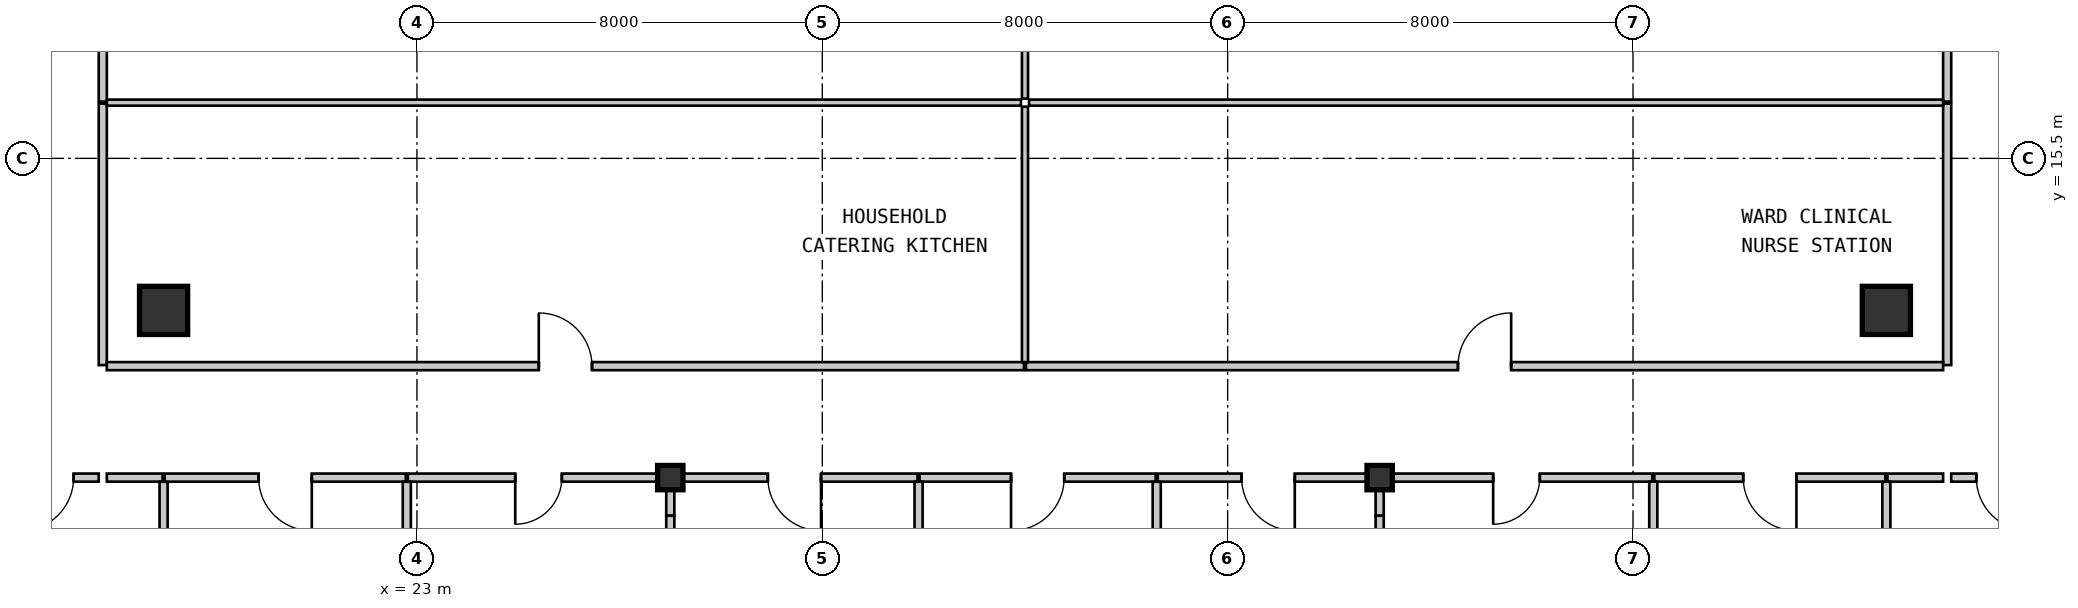
"""IFC4 building model, lengths in metres.
Left out: names, types, materials, properties, quantities, classifications, styles, units other than length and angle.
Written with IfcOpenShell. Run it as: python <this file> out.ifc"""

import sys

from ifc_helpers import new_model, si_unit, direction, frame, frame_2d, origin, origin_2d, place, context, subcontext, project, spatial, rectangle, i_section, extrude, source, transform, mapped, element, fill, save


model = new_model("IFC4")
c1 = context("Model", 3, precision=1e-05, world=origin(), true_north=direction((0.0, 1.0)))
c2 = subcontext(c1, "Body", "Model", "MODEL_VIEW")
j1 = project(units=[si_unit("LENGTHUNIT", "METRE"), si_unit("PLANEANGLEUNIT", "RADIAN")], contexts=[c1])
p1 = place(None, origin())
s1 = spatial("IfcSite", under=j1, at=p1, CompositionType="ELEMENT")
p2 = place(p1, origin())
s2 = spatial("IfcBuilding", under=s1, at=p2, CompositionType="ELEMENT")
p3 = place(p2, frame((0.0, 0.0, 19.95)))
s3 = spatial("IfcBuildingStorey", under=s2, at=p3, CompositionType="ELEMENT", Elevation=19.95)
m1 = source(origin(), c2, "Body", "SweptSolid", [
    extrude(i_section(OverallWidth=0.5, OverallDepth=0.48, WebThickness=0.028, FlangeThickness=0.044, at=origin_2d()), origin(), (0.0, 0.0, 1.0), 3.15),
])
for number, where, z_axis, x_axis in (
    (1, (28.0, 9.2, 0.0), (0.0, 0.0, 1.0), (1.0, 0.0, 0.0)),
    (2, (42.0, 9.2, 0.0), (0.0, 0.0, 1.0), (1.0, 0.0, 0.0)),
):
    element("IfcColumn", number, at=place(p3, frame(where, z_axis=z_axis, x_axis=x_axis)), inside=s3, PredefinedType="COLUMN", context=c2, shape_type="MappedRepresentation", body=[
        mapped(m1, transform((0.0, 0.0, 0.0), scale=1.0)),
    ])
m2 = source(origin(), c2, "Body", "SweptSolid", [
    extrude(rectangle(XDim=0.95, YDim=0.95, at=origin_2d()), origin(), (0.0, 0.0, 1.0), 3.15),
])
for number, where, z_axis, x_axis in (
    (3, (18.0, 12.5, 0.0), (0.0, 0.0, 1.0), (1.0, 0.0, 0.0)),
    (4, (52.0, 12.5, 0.0), (0.0, 0.0, 1.0), (1.0, 0.0, 0.0)),
):
    element("IfcColumn", number, at=place(p3, frame(where, z_axis=z_axis, x_axis=x_axis)), inside=s3, PredefinedType="COLUMN", context=c2, shape_type="MappedRepresentation", body=[
        mapped(m2, transform((0.0, 0.0, 0.0), scale=1.0)),
    ])
m3 = source(origin(), c2, "Body", "SweptSolid", [
    extrude(rectangle(XDim=5.16, YDim=0.16, at=frame_2d((2.58, 0.0))), origin(), (0.0, 0.0, 1.0), 2.93),
])
p4 = place(p3, frame((16.8, 16.58, 0.0), z_axis=(0.0, 0.0, 1.0), x_axis=(0.0, -1.0, 0.0)))
e5 = element("IfcWall", 5, at=p4, inside=s3, PredefinedType="PARTITIONING", context=c2, shape_type="MappedRepresentation", body=[
    mapped(m3, transform((0.0, 0.0, 0.0), scale=1.0)),
])
m4 = source(origin(), c2, "Body", "SweptSolid", [
    extrude(rectangle(XDim=5.1, YDim=0.16, at=frame_2d((2.55, 0.0))), origin(), (0.0, 0.0, 1.0), 2.93),
])
p5 = place(p3, frame((16.8, 21.72, 0.0), z_axis=(0.0, 0.0, 1.0), x_axis=(0.0, -1.0, 0.0)))
e6 = element("IfcWall", 6, at=p5, inside=s3, PredefinedType="PARTITIONING", context=c2, shape_type="MappedRepresentation", body=[
    mapped(m4, transform((0.0, 0.0, 0.0), scale=1.0)),
])
p6 = place(p3, frame((53.2, 11.42, 0.0), z_axis=(0.0, 0.0, 1.0), x_axis=(0.0, 1.0, 0.0)))
e7 = element("IfcWall", 7, at=p6, inside=s3, PredefinedType="PARTITIONING", context=c2, shape_type="MappedRepresentation", body=[
    mapped(m3, transform((0.0, 0.0, 0.0), scale=1.0)),
])
p7 = place(p3, frame((53.2, 16.62, 0.0), z_axis=(0.0, 0.0, 1.0), x_axis=(0.0, 1.0, 0.0)))
e8 = element("IfcWall", 8, at=p7, inside=s3, PredefinedType="PARTITIONING", context=c2, shape_type="MappedRepresentation", body=[
    mapped(m4, transform((0.0, 0.0, 0.0), scale=1.0)),
])
m5 = source(origin(), c2, "Body", "SweptSolid", [
    extrude(rectangle(XDim=2.04, YDim=0.16, at=frame_2d((1.02, 0.0))), origin(), (0.0, 0.0, 1.0), 2.93),
])
p8 = place(p3, frame((16.72, 9.2, 0.0), z_axis=(0.0, 0.0, 1.0), x_axis=(-1.0, 0.0, 0.0)))
e9 = element("IfcWall", 9, at=p8, inside=s3, PredefinedType="PARTITIONING", context=c2, shape_type="MappedRepresentation", body=[
    mapped(m5, transform((0.0, 0.0, 0.0), scale=1.0)),
])
m6 = source(origin(), c2, "Body", "SweptSolid", [
    extrude(rectangle(XDim=1.05, YDim=2.1, at=frame_2d((0.525, 1.05))), frame((0.0, 0.09, 0.0), z_axis=(0.0, -1.0, 0.0), x_axis=(1.0, 0.0, 0.0)), (0.0, 0.0, 1.0), 0.18),
])
p9 = place(p8, frame((0.495, 0.0, 0.0)))
e10 = element("IfcOpeningElement", 10, at=p9, cuts=e9, PredefinedType="OPENING", context=c2, shape_type="MappedRepresentation", body=[
    mapped(m6, transform((0.0, 0.0, 0.0), scale=1.0)),
])
p10 = place(p3, frame((55.32, 9.2, 0.0), z_axis=(0.0, 0.0, 1.0), x_axis=(-1.0, 0.0, 0.0)))
e11 = element("IfcWall", 11, at=p10, inside=s3, PredefinedType="PARTITIONING", context=c2, shape_type="MappedRepresentation", body=[
    mapped(m5, transform((0.0, 0.0, 0.0), scale=1.0)),
])
p11 = place(p10, frame((0.495, 0.0, 0.0)))
e12 = element("IfcOpeningElement", 12, at=p11, cuts=e11, PredefinedType="OPENING", context=c2, shape_type="MappedRepresentation", body=[
    mapped(m6, transform((0.0, 0.0, 0.0), scale=1.0)),
])
m7 = source(origin(), c2, "Body", "SweptSolid", [
    extrude(rectangle(XDim=18.1, YDim=0.16, at=frame_2d((9.05, 0.0))), origin(), (0.0, 0.0, 1.0), 2.93),
])
p12 = place(p3, frame((16.88, 11.4, 0.0), z_axis=(0.0, 0.0, 1.0), x_axis=(1.0, 0.0, 0.0)))
e13 = element("IfcWall", 13, at=p12, inside=s3, PredefinedType="PARTITIONING", context=c2, shape_type="MappedRepresentation", body=[
    mapped(m7, transform((0.0, 0.0, 0.0), scale=1.0)),
])
p13 = place(p12, frame((8.525, 0.0, 0.0)))
e14 = element("IfcOpeningElement", 14, at=p13, cuts=e13, PredefinedType="OPENING", context=c2, shape_type="MappedRepresentation", body=[
    mapped(m6, transform((0.0, 0.0, 0.0), scale=1.0)),
])
p14 = place(p3, frame((35.02, 11.4, 0.0), z_axis=(0.0, 0.0, 1.0), x_axis=(1.0, 0.0, 0.0)))
e15 = element("IfcWall", 15, at=p14, inside=s3, PredefinedType="PARTITIONING", context=c2, shape_type="MappedRepresentation", body=[
    mapped(m7, transform((0.0, 0.0, 0.0), scale=1.0)),
])
p15 = place(p14, frame((8.525, 0.0, 0.0)))
e16 = element("IfcOpeningElement", 16, at=p15, cuts=e15, PredefinedType="OPENING", context=c2, shape_type="MappedRepresentation", body=[
    mapped(m6, transform((0.0, 0.0, 0.0), scale=1.0)),
])
m8 = source(origin(), c2, "Body", "SweptSolid", [
    extrude(rectangle(XDim=1.1, YDim=0.16, at=frame_2d((0.55, 0.0))), origin(), (0.0, 0.0, 1.0), 2.93),
])
p16 = place(p3, frame((17.98, 9.2, 0.0), z_axis=(0.0, 0.0, 1.0), x_axis=(-1.0, 0.0, 0.0)))
e17 = element("IfcWall", 17, at=p16, inside=s3, PredefinedType="PARTITIONING", context=c2, shape_type="MappedRepresentation", body=[
    mapped(m8, transform((0.0, 0.0, 0.0), scale=1.0)),
])
m9 = source(origin(), c2, "Body", "SweptSolid", [
    extrude(rectangle(XDim=4.76, YDim=0.16, at=frame_2d((2.38, 0.0))), origin(), (0.0, 0.0, 1.0), 2.93),
])
p17 = place(p3, frame((22.78, 9.2, 0.0), z_axis=(0.0, 0.0, 1.0), x_axis=(-1.0, 0.0, 0.0)))
e18 = element("IfcWall", 18, at=p17, inside=s3, PredefinedType="PARTITIONING", context=c2, shape_type="MappedRepresentation", body=[
    mapped(m9, transform((0.0, 0.0, 0.0), scale=1.0)),
])
p18 = place(p17, frame((1.855, 0.0, 0.0)))
e19 = element("IfcOpeningElement", 19, at=p18, cuts=e18, PredefinedType="OPENING", context=c2, shape_type="MappedRepresentation", body=[
    mapped(m6, transform((0.0, 0.0, 0.0), scale=1.0)),
])
m10 = source(origin(), c2, "Body", "SweptSolid", [
    extrude(rectangle(XDim=5.159, YDim=0.16, at=frame_2d((2.58, 0.0))), origin(), (0.0, 0.0, 1.0), 2.93),
])
p19 = place(p3, frame((27.98, 9.2, 0.0), z_axis=(0.0, 0.0, 1.0), x_axis=(-1.0, 0.0, 0.0)))
e20 = element("IfcWall", 20, at=p19, inside=s3, PredefinedType="PARTITIONING", context=c2, shape_type="MappedRepresentation", body=[
    mapped(m10, transform((0.0, 0.0, 0.0), scale=1.0)),
])
m11 = source(origin(), c2, "Body", "SweptSolid", [
    extrude(rectangle(XDim=0.92, YDim=2.1, at=frame_2d((0.46, 1.05))), frame((0.0, 0.09, 0.0), z_axis=(0.0, -1.0, 0.0), x_axis=(1.0, 0.0, 0.0)), (0.0, 0.0, 1.0), 0.18),
])
p20 = place(p19, frame((2.12, 0.0, 0.0)))
e21 = element("IfcOpeningElement", 21, at=p20, cuts=e20, PredefinedType="OPENING", context=c2, shape_type="MappedRepresentation", body=[
    mapped(m11, transform((0.0, 0.0, 0.0), scale=1.0)),
])
m12 = source(origin(), c2, "Body", "SweptSolid", [
    extrude(rectangle(XDim=4.859, YDim=0.16, at=frame_2d((2.43, 0.0))), origin(), (0.0, 0.0, 1.0), 2.328),
])
p21 = place(p3, frame((32.88, 9.2, 0.0), z_axis=(0.0, 0.0, 1.0), x_axis=(-1.0, 0.0, 0.0)))
e22 = element("IfcWall", 22, at=p21, inside=s3, PredefinedType="PARTITIONING", context=c2, shape_type="MappedRepresentation", body=[
    mapped(m12, transform((0.0, 0.0, 0.0), scale=1.0)),
])
p22 = place(p21, frame((1.905, 0.0, 0.0)))
e23 = element("IfcOpeningElement", 23, at=p22, cuts=e22, PredefinedType="OPENING", context=c2, shape_type="MappedRepresentation", body=[
    mapped(m6, transform((0.0, 0.0, 0.0), scale=1.0)),
])
m13 = source(origin(), c2, "Body", "SweptSolid", [
    extrude(rectangle(XDim=4.659, YDim=0.16, at=frame_2d((2.33, 0.0))), origin(), (0.0, 0.0, 1.0), 2.328),
])
p23 = place(p3, frame((37.58, 9.2, 0.0), z_axis=(0.0, 0.0, 1.0), x_axis=(-1.0, 0.0, 0.0)))
e24 = element("IfcWall", 24, at=p23, inside=s3, PredefinedType="PARTITIONING", context=c2, shape_type="MappedRepresentation", body=[
    mapped(m13, transform((0.0, 0.0, 0.0), scale=1.0)),
])
p24 = place(p23, frame((1.805, 0.0, 0.0)))
e25 = element("IfcOpeningElement", 25, at=p24, cuts=e24, PredefinedType="OPENING", context=c2, shape_type="MappedRepresentation", body=[
    mapped(m6, transform((0.0, 0.0, 0.0), scale=1.0)),
])
m14 = source(origin(), c2, "Body", "SweptSolid", [
    extrude(rectangle(XDim=4.359, YDim=0.16, at=frame_2d((2.18, 0.0))), origin(), (0.0, 0.0, 1.0), 2.328),
])
p25 = place(p3, frame((41.98, 9.2, 0.0), z_axis=(0.0, 0.0, 1.0), x_axis=(-1.0, 0.0, 0.0)))
e26 = element("IfcWall", 26, at=p25, inside=s3, PredefinedType="PARTITIONING", context=c2, shape_type="MappedRepresentation", body=[
    mapped(m14, transform((0.0, 0.0, 0.0), scale=1.0)),
])
p26 = place(p25, frame((1.655, 0.0, 0.0)))
e27 = element("IfcOpeningElement", 27, at=p26, cuts=e26, PredefinedType="OPENING", context=c2, shape_type="MappedRepresentation", body=[
    mapped(m6, transform((0.0, 0.0, 0.0), scale=1.0)),
])
m15 = source(origin(), c2, "Body", "SweptSolid", [
    extrude(rectangle(XDim=5.36, YDim=0.16, at=frame_2d((2.68, 0.0))), origin(), (0.0, 0.0, 1.0), 2.93),
])
p27 = place(p3, frame((47.38, 9.2, 0.0), z_axis=(0.0, 0.0, 1.0), x_axis=(-1.0, 0.0, 0.0)))
e28 = element("IfcWall", 28, at=p27, inside=s3, PredefinedType="PARTITIONING", context=c2, shape_type="MappedRepresentation", body=[
    mapped(m15, transform((0.0, 0.0, 0.0), scale=1.0)),
])
p28 = place(p27, frame((2.22, 0.0, 0.0)))
e29 = element("IfcOpeningElement", 29, at=p28, cuts=e28, PredefinedType="OPENING", context=c2, shape_type="MappedRepresentation", body=[
    mapped(m11, transform((0.0, 0.0, 0.0), scale=1.0)),
])
m16 = source(origin(), c2, "Body", "SweptSolid", [
    extrude(rectangle(XDim=4.559, YDim=0.16, at=frame_2d((2.28, 0.0))), origin(), (0.0, 0.0, 1.0), 2.93),
])
p29 = place(p3, frame((51.98, 9.2, 0.0), z_axis=(0.0, 0.0, 1.0), x_axis=(-1.0, 0.0, 0.0)))
e30 = element("IfcWall", 30, at=p29, inside=s3, PredefinedType="PARTITIONING", context=c2, shape_type="MappedRepresentation", body=[
    mapped(m16, transform((0.0, 0.0, 0.0), scale=1.0)),
])
p30 = place(p29, frame((1.755, 0.0, 0.0)))
e31 = element("IfcOpeningElement", 31, at=p30, cuts=e30, PredefinedType="OPENING", context=c2, shape_type="MappedRepresentation", body=[
    mapped(m6, transform((0.0, 0.0, 0.0), scale=1.0)),
])
p31 = place(p3, frame((53.12, 9.2, 0.0), z_axis=(0.0, 0.0, 1.0), x_axis=(-1.0, 0.0, 0.0)))
e32 = element("IfcWall", 32, at=p31, inside=s3, PredefinedType="PARTITIONING", context=c2, shape_type="MappedRepresentation", body=[
    mapped(m8, transform((0.0, 0.0, 0.0), scale=1.0)),
])
m17 = source(origin(), c2, "Body", "SweptSolid", [
    extrude(rectangle(XDim=18.04, YDim=0.12, at=frame_2d((9.02, 0.0))), origin(), (0.0, 0.0, 1.0), 2.93),
])
p32 = place(p3, frame((16.88, 16.6, 0.0), z_axis=(0.0, 0.0, 1.0), x_axis=(1.0, 0.0, 0.0)))
e33 = element("IfcWall", 33, at=p32, inside=s3, PredefinedType="PARTITIONING", context=c2, shape_type="MappedRepresentation", body=[
    mapped(m17, transform((0.0, 0.0, 0.0), scale=1.0)),
])
m18 = source(origin(), c2, "Body", "SweptSolid", [
    extrude(rectangle(XDim=5.04, YDim=0.12, at=frame_2d((2.52, 0.0))), origin(), (0.0, 0.0, 1.0), 2.93),
])
for number, where, z_axis, x_axis in (
    (34, (35.0, 16.52, 0.0), (0.0, 0.0, 1.0), (0.0, -1.0, 0.0)),
    (35, (35.0, 21.72, 0.0), (0.0, 0.0, 1.0), (0.0, -1.0, 0.0)),
):
    element("IfcWall", number, at=place(p3, frame(where, z_axis=z_axis, x_axis=x_axis)), inside=s3, PredefinedType="PARTITIONING", context=c2, shape_type="MappedRepresentation", body=[
        mapped(m18, transform((0.0, 0.0, 0.0), scale=1.0)),
    ])
p33 = place(p3, frame((35.08, 16.6, 0.0), z_axis=(0.0, 0.0, 1.0), x_axis=(1.0, 0.0, 0.0)))
e36 = element("IfcWall", 36, at=p33, inside=s3, PredefinedType="PARTITIONING", context=c2, shape_type="MappedRepresentation", body=[
    mapped(m17, transform((0.0, 0.0, 0.0), scale=1.0)),
])
m19 = source(origin(), c2, "Body", "SweptSolid", [
    extrude(rectangle(XDim=2.448, YDim=0.16, at=frame_2d((1.224, 0.0))), origin(), (0.0, 0.0, 1.0), 2.93),
])
p34 = place(p3, frame((18.0, 9.118, 0.0), z_axis=(0.0, 0.0, 1.0), x_axis=(0.0, -1.0, 0.0)))
e37 = element("IfcWall", 37, at=p34, inside=s3, PredefinedType="PARTITIONING", context=c2, shape_type="MappedRepresentation", body=[
    mapped(m19, transform((0.0, 0.0, 0.0), scale=1.0)),
])
m20 = source(origin(), c2, "Body", "SweptSolid", [
    extrude(rectangle(XDim=7.386, YDim=0.16, at=frame_2d((3.693, 0.0))), origin(), (0.0, 0.0, 1.0), 2.93),
])
p35 = place(p3, frame((22.8, 9.118, 0.0), z_axis=(0.0, 0.0, 1.0), x_axis=(0.0, -1.0, 0.0)))
e38 = element("IfcWall", 38, at=p35, inside=s3, PredefinedType="PARTITIONING", context=c2, shape_type="MappedRepresentation", body=[
    mapped(m20, transform((0.0, 0.0, 0.0), scale=1.0)),
])
m21 = source(origin(), c2, "Body", "SweptSolid", [
    extrude(rectangle(XDim=0.672, YDim=0.16, at=frame_2d((0.336, 0.0))), origin(), (0.0, 0.0, 1.0), 2.397),
])
p36 = place(p3, frame((28.0, 9.12, 0.0), z_axis=(0.0, 0.0, 1.0), x_axis=(0.0, -1.0, 0.0)))
e39 = element("IfcWall", 39, at=p36, inside=s3, PredefinedType="PARTITIONING", context=c2, shape_type="MappedRepresentation", body=[
    mapped(m21, transform((0.0, 0.0, 0.0), scale=1.0)),
])
m22 = source(origin(), c2, "Body", "SweptSolid", [
    extrude(rectangle(XDim=1.778, YDim=0.16, at=frame_2d((0.889, 0.0))), origin(), (0.0, 0.0, 1.0), 2.93),
])
p37 = place(p3, frame((28.0, 8.448, 0.0), z_axis=(0.0, 0.0, 1.0), x_axis=(0.0, -1.0, 0.0)))
e40 = element("IfcWall", 40, at=p37, inside=s3, PredefinedType="PARTITIONING", context=c2, shape_type="MappedRepresentation", body=[
    mapped(m22, transform((0.0, 0.0, 0.0), scale=1.0)),
])
for number, where, z_axis, x_axis in (
    (41, (32.9, 9.118, 0.0), (0.0, 0.0, 1.0), (0.0, -1.0, 0.0)),
    (42, (37.6, 9.118, 0.0), (0.0, 0.0, 1.0), (0.0, -1.0, 0.0)),
):
    element("IfcWall", number, at=place(p3, frame(where, z_axis=z_axis, x_axis=x_axis)), inside=s3, PredefinedType="PARTITIONING", context=c2, shape_type="MappedRepresentation", body=[
        mapped(m19, transform((0.0, 0.0, 0.0), scale=1.0)),
    ])
m23 = source(origin(), c2, "Body", "SweptSolid", [
    extrude(rectangle(XDim=0.67, YDim=0.16, at=frame_2d((0.335, 0.0))), origin(), (0.0, 0.0, 1.0), 2.397),
])
p38 = place(p3, frame((42.0, 9.118, 0.0), z_axis=(0.0, 0.0, 1.0), x_axis=(0.0, -1.0, 0.0)))
e43 = element("IfcWall", 43, at=p38, inside=s3, PredefinedType="PARTITIONING", context=c2, shape_type="MappedRepresentation", body=[
    mapped(m23, transform((0.0, 0.0, 0.0), scale=1.0)),
])
m24 = source(origin(), c2, "Body", "SweptSolid", [
    extrude(rectangle(XDim=6.716, YDim=0.16, at=frame_2d((3.358, 0.0))), origin(), (0.0, 0.0, 1.0), 2.93),
])
p39 = place(p3, frame((42.0, 8.448, 0.0), z_axis=(0.0, 0.0, 1.0), x_axis=(0.0, -1.0, 0.0)))
e44 = element("IfcWall", 44, at=p39, inside=s3, PredefinedType="PARTITIONING", context=c2, shape_type="MappedRepresentation", body=[
    mapped(m24, transform((0.0, 0.0, 0.0), scale=1.0)),
])
m25 = source(origin(), c2, "Body", "SweptSolid", [
    extrude(rectangle(XDim=2.45, YDim=0.16, at=frame_2d((1.225, 0.0))), origin(), (0.0, 0.0, 1.0), 2.93),
])
p40 = place(p3, frame((47.4, 9.12, 0.0), z_axis=(0.0, 0.0, 1.0), x_axis=(0.0, -1.0, 0.0)))
e45 = element("IfcWall", 45, at=p40, inside=s3, PredefinedType="PARTITIONING", context=c2, shape_type="MappedRepresentation", body=[
    mapped(m25, transform((0.0, 0.0, 0.0), scale=1.0)),
])
p41 = place(p3, frame((52.0, 9.118, 0.0), z_axis=(0.0, 0.0, 1.0), x_axis=(0.0, -1.0, 0.0)))
e46 = element("IfcWall", 46, at=p41, inside=s3, PredefinedType="PARTITIONING", context=c2, shape_type="MappedRepresentation", body=[
    mapped(m19, transform((0.0, 0.0, 0.0), scale=1.0)),
])
m26 = source(origin(), c2, "Body", "SweptSolid", [
    extrude(rectangle(XDim=1.05, YDim=2.1, at=frame_2d((0.525, 1.05))), frame((0.0, 0.025, 0.0), z_axis=(0.0, -1.0, 0.0), x_axis=(1.0, 0.0, 0.0)), (0.0, 0.0, 1.0), 0.05),
])
p42 = place(p9, origin())
e47 = element("IfcDoor", 47, at=p42, inside=s3, OperationType="SINGLE_SWING_RIGHT", PredefinedType="DOOR", context=c2, shape_type="MappedRepresentation", body=[
    mapped(m26, transform((0.0, 0.0, 0.0), scale=1.0)),
])
fill(e10, e47)
p43 = place(p11, origin())
e48 = element("IfcDoor", 48, at=p43, inside=s3, OperationType="SINGLE_SWING_LEFT", PredefinedType="DOOR", context=c2, shape_type="MappedRepresentation", body=[
    mapped(m26, transform((0.0, 0.0, 0.0), scale=1.0)),
])
fill(e12, e48)
p44 = place(p13, origin())
e49 = element("IfcDoor", 49, at=p44, inside=s3, OperationType="SINGLE_SWING_LEFT", PredefinedType="DOOR", context=c2, shape_type="MappedRepresentation", body=[
    mapped(m26, transform((0.0, 0.0, 0.0), scale=1.0)),
])
fill(e14, e49)
p45 = place(p15, origin())
e50 = element("IfcDoor", 50, at=p45, inside=s3, OperationType="SINGLE_SWING_RIGHT", PredefinedType="DOOR", context=c2, shape_type="MappedRepresentation", body=[
    mapped(m26, transform((0.0, 0.0, 0.0), scale=1.0)),
])
fill(e16, e50)
p46 = place(p18, origin())
e51 = element("IfcDoor", 51, at=p46, inside=s3, OperationType="SINGLE_SWING_LEFT", PredefinedType="DOOR", context=c2, shape_type="MappedRepresentation", body=[
    mapped(m26, transform((0.0, 0.0, 0.0), scale=1.0)),
])
fill(e19, e51)
m27 = source(origin(), c2, "Body", "SweptSolid", [
    extrude(rectangle(XDim=0.92, YDim=2.1, at=frame_2d((0.46, 1.05))), frame((0.0, 0.025, 0.0), z_axis=(0.0, -1.0, 0.0), x_axis=(1.0, 0.0, 0.0)), (0.0, 0.0, 1.0), 0.05),
])
p47 = place(p20, origin())
e52 = element("IfcDoor", 52, at=p47, inside=s3, OperationType="SINGLE_SWING_RIGHT", PredefinedType="DOOR", context=c2, shape_type="MappedRepresentation", body=[
    mapped(m27, transform((0.0, 0.0, 0.0), scale=1.0)),
])
fill(e21, e52)
p48 = place(p22, origin())
e53 = element("IfcDoor", 53, at=p48, inside=s3, OperationType="SINGLE_SWING_LEFT", PredefinedType="DOOR", context=c2, shape_type="MappedRepresentation", body=[
    mapped(m26, transform((0.0, 0.0, 0.0), scale=1.0)),
])
fill(e23, e53)
p49 = place(p24, origin())
e54 = element("IfcDoor", 54, at=p49, inside=s3, OperationType="SINGLE_SWING_RIGHT", PredefinedType="DOOR", context=c2, shape_type="MappedRepresentation", body=[
    mapped(m26, transform((0.0, 0.0, 0.0), scale=1.0)),
])
fill(e25, e54)
p50 = place(p26, origin())
e55 = element("IfcDoor", 55, at=p50, inside=s3, OperationType="SINGLE_SWING_LEFT", PredefinedType="DOOR", context=c2, shape_type="MappedRepresentation", body=[
    mapped(m26, transform((0.0, 0.0, 0.0), scale=1.0)),
])
fill(e27, e55)
p51 = place(p28, origin())
e56 = element("IfcDoor", 56, at=p51, inside=s3, OperationType="SINGLE_SWING_RIGHT", PredefinedType="DOOR", context=c2, shape_type="MappedRepresentation", body=[
    mapped(m27, transform((0.0, 0.0, 0.0), scale=1.0)),
])
fill(e29, e56)
p52 = place(p30, origin())
e57 = element("IfcDoor", 57, at=p52, inside=s3, OperationType="SINGLE_SWING_LEFT", PredefinedType="DOOR", context=c2, shape_type="MappedRepresentation", body=[
    mapped(m26, transform((0.0, 0.0, 0.0), scale=1.0)),
])
fill(e31, e57)
save(model, sys.argv[1])
